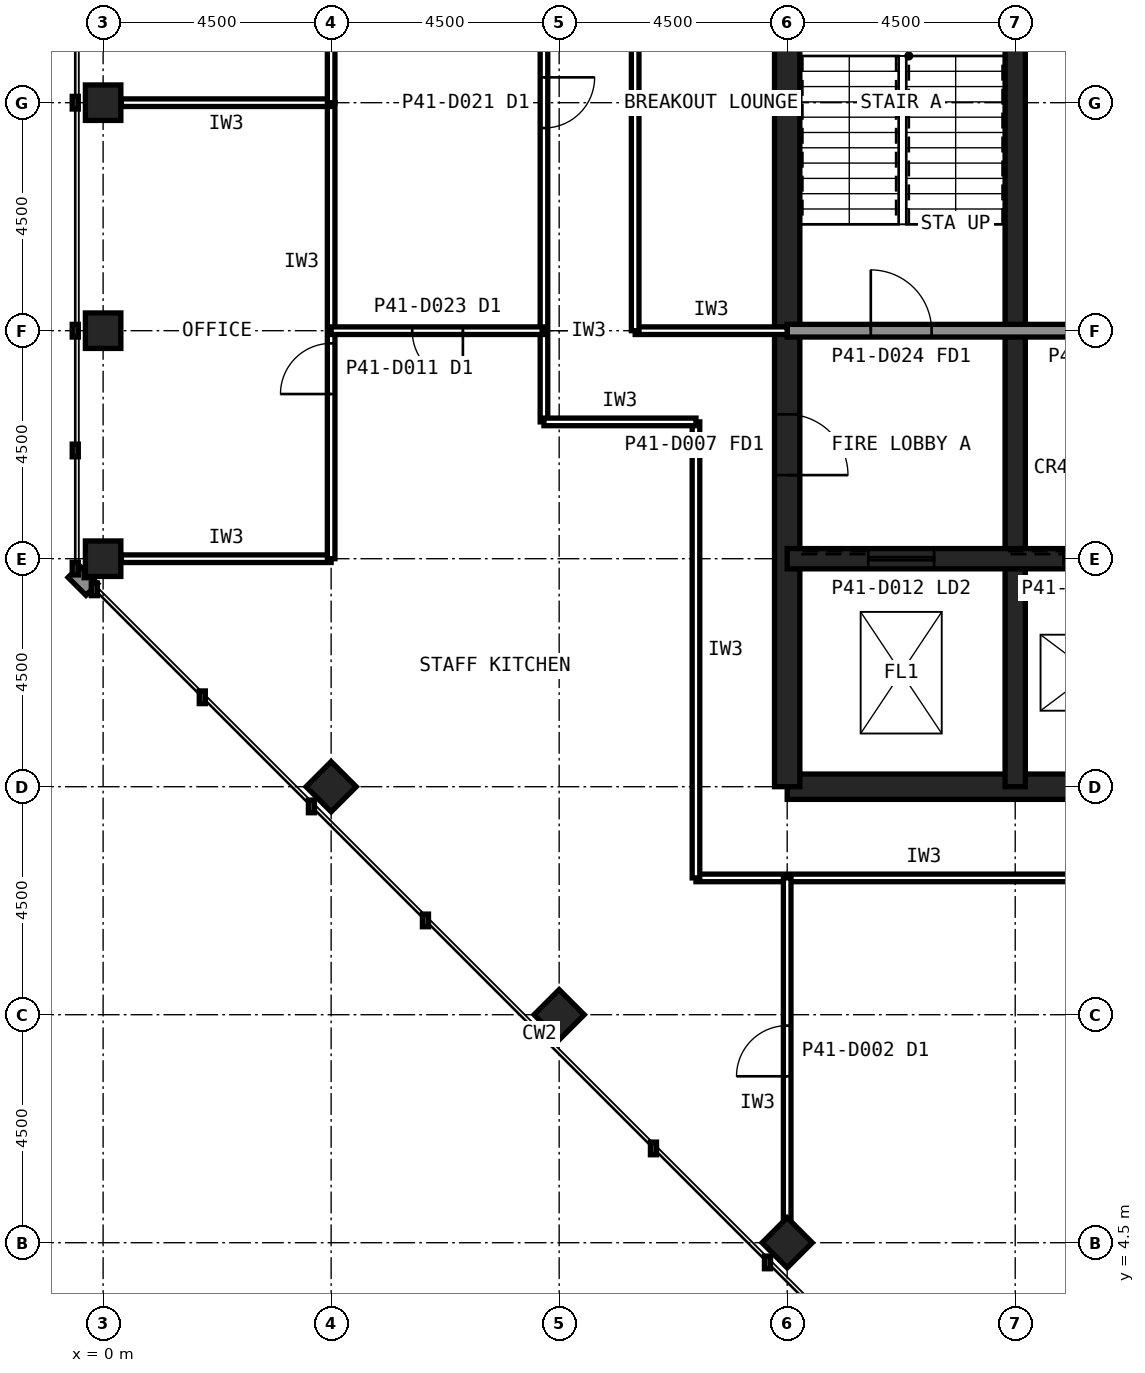
"""IFC4 building model, lengths in metres.
Left out: names, types, materials, properties, quantities, classifications, styles, units other than length and angle.
Written with IfcOpenShell. Run it as: python <this file> out.ifc"""

import sys

from ifc_helpers import new_model, si_unit, direction, frame, frame_2d, origin, origin_2d, place, context, subcontext, project, spatial, rectangle, hollow_rectangle, extrude, element, fill, save


model = new_model("IFC4")
c1 = context("Model", 3, precision=1e-05, world=origin(), true_north=direction((0.0, 1.0)))
c2 = subcontext(c1, "Body", "Model", "MODEL_VIEW")
j1 = project(units=[si_unit("LENGTHUNIT", "METRE"), si_unit("PLANEANGLEUNIT", "RADIAN")], contexts=[c1])
p1 = place(None, origin())
s1 = spatial("IfcSite", under=j1, at=p1, CompositionType="ELEMENT")
p2 = place(p1, origin())
s2 = spatial("IfcBuilding", under=s1, at=p2, CompositionType="ELEMENT")
p3 = place(p2, frame((0.0, 0.0, 175.6)))
s3 = spatial("IfcBuildingStorey", under=s2, at=p3, CompositionType="ELEMENT", Elevation=175.6)
for number, where, z_axis, x_axis in (
    (1, (0.0, 27.0, 0.0), (0.0, 0.0, 1.0), (1.0, 0.0, 0.0)),
    (2, (0.0, 22.5, 0.0), (0.0, 0.0, 1.0), (1.0, 0.0, 0.0)),
    (3, (0.0, 18.0, 0.0), (0.0, 0.0, 1.0), (1.0, 0.0, 0.0)),
    (4, (13.5, 4.5, 0.0), (0.0, 0.0, 1.0), (0.707, 0.707, 0.0)),
    (5, (9.0, 9.0, 0.0), (0.0, 0.0, 1.0), (0.707, 0.707, 0.0)),
    (6, (4.5, 13.5, 0.0), (0.0, 0.0, 1.0), (0.707, 0.707, 0.0)),
):
    element("IfcColumn", number, at=place(p3, frame(where, z_axis=z_axis, x_axis=x_axis)), inside=s3, PredefinedType="COLUMN", context=c2, shape_type="SweptSolid", body=[
        extrude(hollow_rectangle(XDim=0.7, YDim=0.7, WallThickness=0.036, at=origin_2d()), origin(), (0.0, 0.0, 1.0), 4.0),
    ])
p4 = place(p3, frame((13.5, 13.5, 0.0), z_axis=(0.0, 0.0, 1.0), x_axis=(1.0, 0.0, 0.0)))
e7 = element("IfcWall", 7, at=p4, inside=s3, PredefinedType="SHEAR", context=c2, shape_type="SweptSolid", body=[
    extrude(rectangle(XDim=27.0, YDim=0.5, at=frame_2d((13.5, 0.0))), origin(), (0.0, 0.0, 1.0), 4.0),
])
p5 = place(p3, frame((13.5, 40.5, 0.0), z_axis=(0.0, 0.0, 1.0), x_axis=(0.0, -1.0, 0.0)))
e8 = element("IfcWall", 8, at=p5, inside=s3, PredefinedType="SHEAR", context=c2, shape_type="SweptSolid", body=[
    extrude(rectangle(XDim=27.0, YDim=0.5, at=frame_2d((13.5, 0.0))), origin(), (0.0, 0.0, 1.0), 4.0),
])
p6 = place(p5, frame((19.65, 0.0, 0.0)))
e9 = element("IfcOpeningElement", 9, at=p6, cuts=e8, PredefinedType="OPENING", context=c2, shape_type="SweptSolid", body=[
    extrude(rectangle(XDim=1.2, YDim=2.1, at=frame_2d((0.6, 1.05))), frame((0.0, 0.26, 0.0), z_axis=(0.0, -1.0, 0.0), x_axis=(1.0, 0.0, 0.0)), (0.0, 0.0, 1.0), 0.52),
])
p7 = place(p5, frame((5.85, 0.0, 0.0)))
e10 = element("IfcOpeningElement", 10, at=p7, cuts=e8, PredefinedType="OPENING", context=c2, shape_type="SweptSolid", body=[
    extrude(rectangle(XDim=1.8, YDim=2.1, at=frame_2d((0.9, 1.05))), frame((0.0, 0.26, 0.0), z_axis=(0.0, -1.0, 0.0), x_axis=(1.0, 0.0, 0.0)), (0.0, 0.0, 1.0), 0.52),
])
p8 = place(p3, frame((18.0, 13.5, 0.0), z_axis=(0.0, 0.0, 1.0), x_axis=(0.0, 1.0, 0.0)))
e11 = element("IfcWall", 11, at=p8, inside=s3, PredefinedType="SHEAR", context=c2, shape_type="SweptSolid", body=[
    extrude(rectangle(XDim=18.0, YDim=0.4, at=frame_2d((9.0, 0.0))), origin(), (0.0, 0.0, 1.0), 4.0),
])
p9 = place(p3, frame((13.5, 18.0, 0.0), z_axis=(0.0, 0.0, 1.0), x_axis=(1.0, 0.0, 0.0)))
e12 = element("IfcWall", 12, at=p9, inside=s3, PredefinedType="SHEAR", context=c2, shape_type="SweptSolid", body=[
    extrude(rectangle(XDim=27.0, YDim=0.4, at=frame_2d((13.5, 0.0))), origin(), (0.0, 0.0, 1.0), 4.0),
])
p10 = place(p9, frame((24.3, 0.0, 0.0)))
e13 = element("IfcOpeningElement", 13, at=p10, cuts=e12, PredefinedType="OPENING", context=c2, shape_type="SweptSolid", body=[
    extrude(rectangle(XDim=0.9, YDim=2.1, at=frame_2d((0.45, 1.05))), frame((0.0, 0.21, 0.0), z_axis=(0.0, -1.0, 0.0), x_axis=(1.0, 0.0, 0.0)), (0.0, 0.0, 1.0), 0.42),
])
p11 = place(p9, frame((5.45, 0.0, 0.0)))
e14 = element("IfcOpeningElement", 14, at=p11, cuts=e12, PredefinedType="OPENING", context=c2, shape_type="SweptSolid", body=[
    extrude(rectangle(XDim=1.1, YDim=2.1, at=frame_2d((0.55, 1.05))), frame((0.0, 0.21, 0.0), z_axis=(0.0, -1.0, 0.0), x_axis=(1.0, 0.0, 0.0)), (0.0, 0.0, 1.0), 0.42),
])
p12 = place(p9, frame((8.45, 0.0, 0.0)))
e15 = element("IfcOpeningElement", 15, at=p12, cuts=e12, PredefinedType="OPENING", context=c2, shape_type="SweptSolid", body=[
    extrude(rectangle(XDim=1.1, YDim=2.1, at=frame_2d((0.55, 1.05))), frame((0.0, 0.21, 0.0), z_axis=(0.0, -1.0, 0.0), x_axis=(1.0, 0.0, 0.0)), (0.0, 0.0, 1.0), 0.42),
])
p13 = place(p9, frame((11.45, 0.0, 0.0)))
e16 = element("IfcOpeningElement", 16, at=p13, cuts=e12, PredefinedType="OPENING", context=c2, shape_type="SweptSolid", body=[
    extrude(rectangle(XDim=1.1, YDim=2.1, at=frame_2d((0.55, 1.05))), frame((0.0, 0.21, 0.0), z_axis=(0.0, -1.0, 0.0), x_axis=(1.0, 0.0, 0.0)), (0.0, 0.0, 1.0), 0.42),
])
p14 = place(p9, frame((14.45, 0.0, 0.0)))
e17 = element("IfcOpeningElement", 17, at=p14, cuts=e12, PredefinedType="OPENING", context=c2, shape_type="SweptSolid", body=[
    extrude(rectangle(XDim=1.1, YDim=2.1, at=frame_2d((0.55, 1.05))), frame((0.0, 0.21, 0.0), z_axis=(0.0, -1.0, 0.0), x_axis=(1.0, 0.0, 0.0)), (0.0, 0.0, 1.0), 0.42),
])
p15 = place(p9, frame((17.45, 0.0, 0.0)))
e18 = element("IfcOpeningElement", 18, at=p15, cuts=e12, PredefinedType="OPENING", context=c2, shape_type="SweptSolid", body=[
    extrude(rectangle(XDim=1.1, YDim=2.1, at=frame_2d((0.55, 1.05))), frame((0.0, 0.21, 0.0), z_axis=(0.0, -1.0, 0.0), x_axis=(1.0, 0.0, 0.0)), (0.0, 0.0, 1.0), 0.42),
])
p16 = place(p9, frame((20.45, 0.0, 0.0)))
e19 = element("IfcOpeningElement", 19, at=p16, cuts=e12, PredefinedType="OPENING", context=c2, shape_type="SweptSolid", body=[
    extrude(rectangle(XDim=1.1, YDim=2.1, at=frame_2d((0.55, 1.05))), frame((0.0, 0.21, 0.0), z_axis=(0.0, -1.0, 0.0), x_axis=(1.0, 0.0, 0.0)), (0.0, 0.0, 1.0), 0.42),
])
p17 = place(p9, frame((1.6, 0.0, 0.0)))
e20 = element("IfcOpeningElement", 20, at=p17, cuts=e12, PredefinedType="OPENING", context=c2, shape_type="SweptSolid", body=[
    extrude(rectangle(XDim=1.3, YDim=2.2, at=frame_2d((0.65, 1.1))), frame((0.0, 0.21, 0.0), z_axis=(0.0, -1.0, 0.0), x_axis=(1.0, 0.0, 0.0)), (0.0, 0.0, 1.0), 0.42),
])
p18 = place(p3, frame((13.5, 22.5, 0.0), z_axis=(0.0, 0.0, 1.0), x_axis=(1.0, 0.0, 0.0)))
e21 = element("IfcWall", 21, at=p18, inside=s3, PredefinedType="SOLIDWALL", context=c2, shape_type="SweptSolid", body=[
    extrude(rectangle(XDim=27.0, YDim=0.25, at=frame_2d((13.5, 0.0))), origin(), (0.0, 0.0, 1.0), 3.84),
])
p19 = place(p18, frame((1.65, 0.0, 0.0)))
e22 = element("IfcOpeningElement", 22, at=p19, cuts=e21, PredefinedType="OPENING", context=c2, shape_type="SweptSolid", body=[
    extrude(rectangle(XDim=1.2, YDim=2.1, at=frame_2d((0.6, 1.05))), frame((0.0, 0.135, 0.0), z_axis=(0.0, -1.0, 0.0), x_axis=(1.0, 0.0, 0.0)), (0.0, 0.0, 1.0), 0.27),
])
p20 = place(p18, frame((6.025, 0.0, 0.0)))
e23 = element("IfcOpeningElement", 23, at=p20, cuts=e21, PredefinedType="OPENING", context=c2, shape_type="SweptSolid", body=[
    extrude(rectangle(XDim=1.0, YDim=2.1, at=frame_2d((0.5, 1.05))), frame((0.0, 0.135, 0.0), z_axis=(0.0, -1.0, 0.0), x_axis=(1.0, 0.0, 0.0)), (0.0, 0.0, 1.0), 0.27),
])
p21 = place(p18, frame((10.525, 0.0, 0.0)))
e24 = element("IfcOpeningElement", 24, at=p21, cuts=e21, PredefinedType="OPENING", context=c2, shape_type="SweptSolid", body=[
    extrude(rectangle(XDim=1.0, YDim=2.1, at=frame_2d((0.5, 1.05))), frame((0.0, 0.135, 0.0), z_axis=(0.0, -1.0, 0.0), x_axis=(1.0, 0.0, 0.0)), (0.0, 0.0, 1.0), 0.27),
])
p22 = place(p18, frame((19.75, 0.0, 0.0)))
e25 = element("IfcOpeningElement", 25, at=p22, cuts=e21, PredefinedType="OPENING", context=c2, shape_type="SweptSolid", body=[
    extrude(rectangle(XDim=1.0, YDim=2.1, at=frame_2d((0.5, 1.05))), frame((0.0, 0.135, 0.0), z_axis=(0.0, -1.0, 0.0), x_axis=(1.0, 0.0, 0.0)), (0.0, 0.0, 1.0), 0.27),
])
p23 = place(p18, frame((15.05, 0.0, 0.0)))
e26 = element("IfcOpeningElement", 26, at=p23, cuts=e21, PredefinedType="OPENING", context=c2, shape_type="SweptSolid", body=[
    extrude(rectangle(XDim=1.4, YDim=2.4, at=frame_2d((0.7, 1.2))), frame((0.0, 0.135, 0.0), z_axis=(0.0, -1.0, 0.0), x_axis=(1.0, 0.0, 0.0)), (0.0, 0.0, 1.0), 0.27),
])
p24 = place(p3, frame((8.7, 33.3, 0.0), z_axis=(0.0, 0.0, 1.0), x_axis=(0.0, -1.0, 0.0)))
e27 = element("IfcWall", 27, at=p24, inside=s3, PredefinedType="PARTITIONING", context=c2, shape_type="SweptSolid", body=[
    extrude(rectangle(XDim=12.6, YDim=0.15, at=frame_2d((6.3, 0.0))), origin(), (0.0, 0.0, 1.0), 3.84),
])
p25 = place(p24, frame((5.8, 0.0, 0.0)))
e28 = element("IfcOpeningElement", 28, at=p25, cuts=e27, PredefinedType="OPENING", context=c2, shape_type="SweptSolid", body=[
    extrude(rectangle(XDim=1.0, YDim=2.1, at=frame_2d((0.5, 1.05))), frame((0.0, 0.085, 0.0), z_axis=(0.0, -1.0, 0.0), x_axis=(1.0, 0.0, 0.0)), (0.0, 0.0, 1.0), 0.17),
])
for number, where, z_axis, x_axis in (
    (29, (11.7, 11.7, 0.0), (0.0, 0.0, 1.0), (1.0, 0.0, 0.0)),
    (30, (11.7, 20.7, 0.0), (0.0, 0.0, 1.0), (0.0, -1.0, 0.0)),
):
    element("IfcWall", number, at=place(p3, frame(where, z_axis=z_axis, x_axis=x_axis)), inside=s3, PredefinedType="PARTITIONING", context=c2, shape_type="SweptSolid", body=[
        extrude(rectangle(XDim=9.0, YDim=0.15, at=frame_2d((4.5, 0.0))), origin(), (0.0, 0.0, 1.0), 3.84),
    ])
p26 = place(p3, frame((8.7, 20.7, 0.0), z_axis=(0.0, 0.0, 1.0), x_axis=(1.0, 0.0, 0.0)))
e31 = element("IfcWall", 31, at=p26, inside=s3, PredefinedType="PARTITIONING", context=c2, shape_type="SweptSolid", body=[
    extrude(rectangle(XDim=3.0, YDim=0.15, at=frame_2d((1.5, 0.0))), origin(), (0.0, 0.0, 1.0), 3.84),
])
p27 = place(p3, frame((0.36, 18.0, 0.0), z_axis=(0.0, 0.0, 1.0), x_axis=(1.0, 0.0, 0.0)))
e32 = element("IfcWall", 32, at=p27, inside=s3, PredefinedType="PARTITIONING", context=c2, shape_type="SweptSolid", body=[
    extrude(rectangle(XDim=4.14, YDim=0.15, at=frame_2d((2.07, 0.0))), origin(), (0.0, 0.0, 1.0), 2.989),
])
p28 = place(p3, frame((4.5, 18.0, 0.0), z_axis=(0.0, 0.0, 1.0), x_axis=(0.0, 1.0, 0.0)))
e33 = element("IfcWall", 33, at=p28, inside=s3, PredefinedType="PARTITIONING", context=c2, shape_type="SweptSolid", body=[
    extrude(rectangle(XDim=9.0, YDim=0.15, at=frame_2d((4.5, 0.0))), origin(), (0.0, 0.0, 1.0), 3.84),
])
p29 = place(p28, frame((3.25, 0.0, 0.0)))
e34 = element("IfcOpeningElement", 34, at=p29, cuts=e33, PredefinedType="OPENING", context=c2, shape_type="SweptSolid", body=[
    extrude(rectangle(XDim=1.0, YDim=2.1, at=frame_2d((0.5, 1.05))), frame((0.0, 0.085, 0.0), z_axis=(0.0, -1.0, 0.0), x_axis=(1.0, 0.0, 0.0)), (0.0, 0.0, 1.0), 0.17),
])
p30 = place(p3, frame((4.5, 27.0, 0.0), z_axis=(0.0, 0.0, 1.0), x_axis=(-1.0, 0.0, 0.0)))
e35 = element("IfcWall", 35, at=p30, inside=s3, PredefinedType="PARTITIONING", context=c2, shape_type="SweptSolid", body=[
    extrude(rectangle(XDim=4.14, YDim=0.15, at=frame_2d((2.07, 0.0))), origin(), (0.0, 0.0, 1.0), 2.989),
])
p31 = place(p3, frame((4.5, 27.0, 0.0), z_axis=(0.0, 0.0, 1.0), x_axis=(0.0, 1.0, 0.0)))
e36 = element("IfcWall", 36, at=p31, inside=s3, PredefinedType="PARTITIONING", context=c2, shape_type="SweptSolid", body=[
    extrude(rectangle(XDim=9.0, YDim=0.15, at=frame_2d((4.5, 0.0))), origin(), (0.0, 0.0, 1.0), 3.84),
])
p32 = place(p31, frame((4.0, 0.0, 0.0)))
e37 = element("IfcOpeningElement", 37, at=p32, cuts=e36, PredefinedType="OPENING", context=c2, shape_type="SweptSolid", body=[
    extrude(rectangle(XDim=1.0, YDim=2.1, at=frame_2d((0.5, 1.05))), frame((0.0, 0.085, 0.0), z_axis=(0.0, -1.0, 0.0), x_axis=(1.0, 0.0, 0.0)), (0.0, 0.0, 1.0), 0.17),
])
p33 = place(p3, frame((10.5, 22.5, 0.0), z_axis=(0.0, 0.0, 1.0), x_axis=(1.0, 0.0, 0.0)))
e38 = element("IfcWall", 38, at=p33, inside=s3, PredefinedType="PARTITIONING", context=c2, shape_type="SweptSolid", body=[
    extrude(rectangle(XDim=3.0, YDim=0.15, at=frame_2d((1.5, 0.0))), origin(), (0.0, 0.0, 1.0), 2.989),
])
p34 = place(p3, frame((10.5, 31.5, 0.0), z_axis=(0.0, 0.0, 1.0), x_axis=(0.0, -1.0, 0.0)))
e39 = element("IfcWall", 39, at=p34, inside=s3, PredefinedType="PARTITIONING", context=c2, shape_type="SweptSolid", body=[
    extrude(rectangle(XDim=9.0, YDim=0.15, at=frame_2d((4.5, 0.0))), origin(), (0.0, 0.0, 1.0), 3.84),
])
p35 = place(p3, frame((13.5, 4.87, 0.0), z_axis=(0.0, 0.0, 1.0), x_axis=(0.0, 1.0, 0.0)))
e40 = element("IfcWall", 40, at=p35, inside=s3, PredefinedType="PARTITIONING", context=c2, shape_type="SweptSolid", body=[
    extrude(rectangle(XDim=6.83, YDim=0.15, at=frame_2d((3.415, 0.0))), origin(), (0.0, 0.0, 1.0), 2.989),
])
p36 = place(p35, frame((2.915, 0.0, 0.0)))
e41 = element("IfcOpeningElement", 41, at=p36, cuts=e40, PredefinedType="OPENING", context=c2, shape_type="SweptSolid", body=[
    extrude(rectangle(XDim=1.0, YDim=2.1, at=frame_2d((0.5, 1.05))), frame((0.0, 0.085, 0.0), z_axis=(0.0, -1.0, 0.0), x_axis=(1.0, 0.0, 0.0)), (0.0, 0.0, 1.0), 0.17),
])
p37 = place(p3, frame((8.7, 22.5, 0.0), z_axis=(0.0, 0.0, 1.0), x_axis=(-1.0, 0.0, 0.0)))
e42 = element("IfcWall", 42, at=p37, inside=s3, PredefinedType="PARTITIONING", context=c2, shape_type="SweptSolid", body=[
    extrude(rectangle(XDim=4.2, YDim=0.15, at=frame_2d((2.1, 0.0))), origin(), (0.0, 0.0, 1.0), 2.989),
])
p38 = place(p37, frame((1.6, 0.0, 0.0)))
e43 = element("IfcOpeningElement", 43, at=p38, cuts=e42, PredefinedType="OPENING", context=c2, shape_type="SweptSolid", body=[
    extrude(rectangle(XDim=1.0, YDim=2.1, at=frame_2d((0.5, 1.05))), frame((0.0, 0.085, 0.0), z_axis=(0.0, -1.0, 0.0), x_axis=(1.0, 0.0, 0.0)), (0.0, 0.0, 1.0), 0.17),
])
p39 = place(p6, origin())
e44 = element("IfcDoor", 44, at=p39, inside=s3, OperationType="SINGLE_SWING_RIGHT", PredefinedType="DOOR", context=c2, shape_type="SweptSolid", body=[
    extrude(rectangle(XDim=1.2, YDim=2.1, at=frame_2d((0.6, 1.05))), frame((0.0, 0.025, 0.0), z_axis=(0.0, -1.0, 0.0), x_axis=(1.0, 0.0, 0.0)), (0.0, 0.0, 1.0), 0.05),
])
fill(e9, e44)
p40 = place(p19, origin())
e45 = element("IfcDoor", 45, at=p40, inside=s3, OperationType="SINGLE_SWING_LEFT", PredefinedType="DOOR", context=c2, shape_type="SweptSolid", body=[
    extrude(rectangle(XDim=1.2, YDim=2.1, at=frame_2d((0.6, 1.05))), frame((0.0, 0.025, 0.0), z_axis=(0.0, -1.0, 0.0), x_axis=(1.0, 0.0, 0.0)), (0.0, 0.0, 1.0), 0.05),
])
fill(e22, e45)
p41 = place(p11, origin())
e46 = element("IfcDoor", 46, at=p41, inside=s3, OperationType="SLIDING_TO_LEFT", PredefinedType="DOOR", context=c2, shape_type="SweptSolid", body=[
    extrude(rectangle(XDim=1.1, YDim=2.1, at=frame_2d((0.55, 1.05))), frame((0.0, 0.025, 0.0), z_axis=(0.0, -1.0, 0.0), x_axis=(1.0, 0.0, 0.0)), (0.0, 0.0, 1.0), 0.05),
])
fill(e14, e46)
p42 = place(p17, origin())
e47 = element("IfcDoor", 47, at=p42, inside=s3, OperationType="SLIDING_TO_LEFT", PredefinedType="DOOR", context=c2, shape_type="SweptSolid", body=[
    extrude(rectangle(XDim=1.3, YDim=2.2, at=frame_2d((0.65, 1.1))), frame((0.0, 0.025, 0.0), z_axis=(0.0, -1.0, 0.0), x_axis=(1.0, 0.0, 0.0)), (0.0, 0.0, 1.0), 0.05),
])
fill(e20, e47)
p43 = place(p25, origin())
e48 = element("IfcDoor", 48, at=p43, inside=s3, OperationType="SINGLE_SWING_LEFT", PredefinedType="DOOR", context=c2, shape_type="SweptSolid", body=[
    extrude(rectangle(XDim=1.0, YDim=2.1, at=frame_2d((0.5, 1.05))), frame((0.0, 0.025, 0.0), z_axis=(0.0, -1.0, 0.0), x_axis=(1.0, 0.0, 0.0)), (0.0, 0.0, 1.0), 0.05),
])
fill(e28, e48)
p44 = place(p29, origin())
e49 = element("IfcDoor", 49, at=p44, inside=s3, OperationType="SINGLE_SWING_LEFT", PredefinedType="DOOR", context=c2, shape_type="SweptSolid", body=[
    extrude(rectangle(XDim=1.0, YDim=2.1, at=frame_2d((0.5, 1.05))), frame((0.0, 0.025, 0.0), z_axis=(0.0, -1.0, 0.0), x_axis=(1.0, 0.0, 0.0)), (0.0, 0.0, 1.0), 0.05),
])
fill(e34, e49)
p45 = place(p36, origin())
e50 = element("IfcDoor", 50, at=p45, inside=s3, OperationType="SINGLE_SWING_LEFT", PredefinedType="DOOR", context=c2, shape_type="SweptSolid", body=[
    extrude(rectangle(XDim=1.0, YDim=2.1, at=frame_2d((0.5, 1.05))), frame((0.0, 0.025, 0.0), z_axis=(0.0, -1.0, 0.0), x_axis=(1.0, 0.0, 0.0)), (0.0, 0.0, 1.0), 0.05),
])
fill(e41, e50)
p46 = place(p38, origin())
e51 = element("IfcDoor", 51, at=p46, inside=s3, OperationType="SINGLE_SWING_LEFT", PredefinedType="DOOR", context=c2, shape_type="SweptSolid", body=[
    extrude(rectangle(XDim=1.0, YDim=2.1, at=frame_2d((0.5, 1.05))), frame((0.0, 0.025, 0.0), z_axis=(0.0, -1.0, 0.0), x_axis=(1.0, 0.0, 0.0)), (0.0, 0.0, 1.0), 0.05),
])
fill(e43, e51)
save(model, sys.argv[1])
